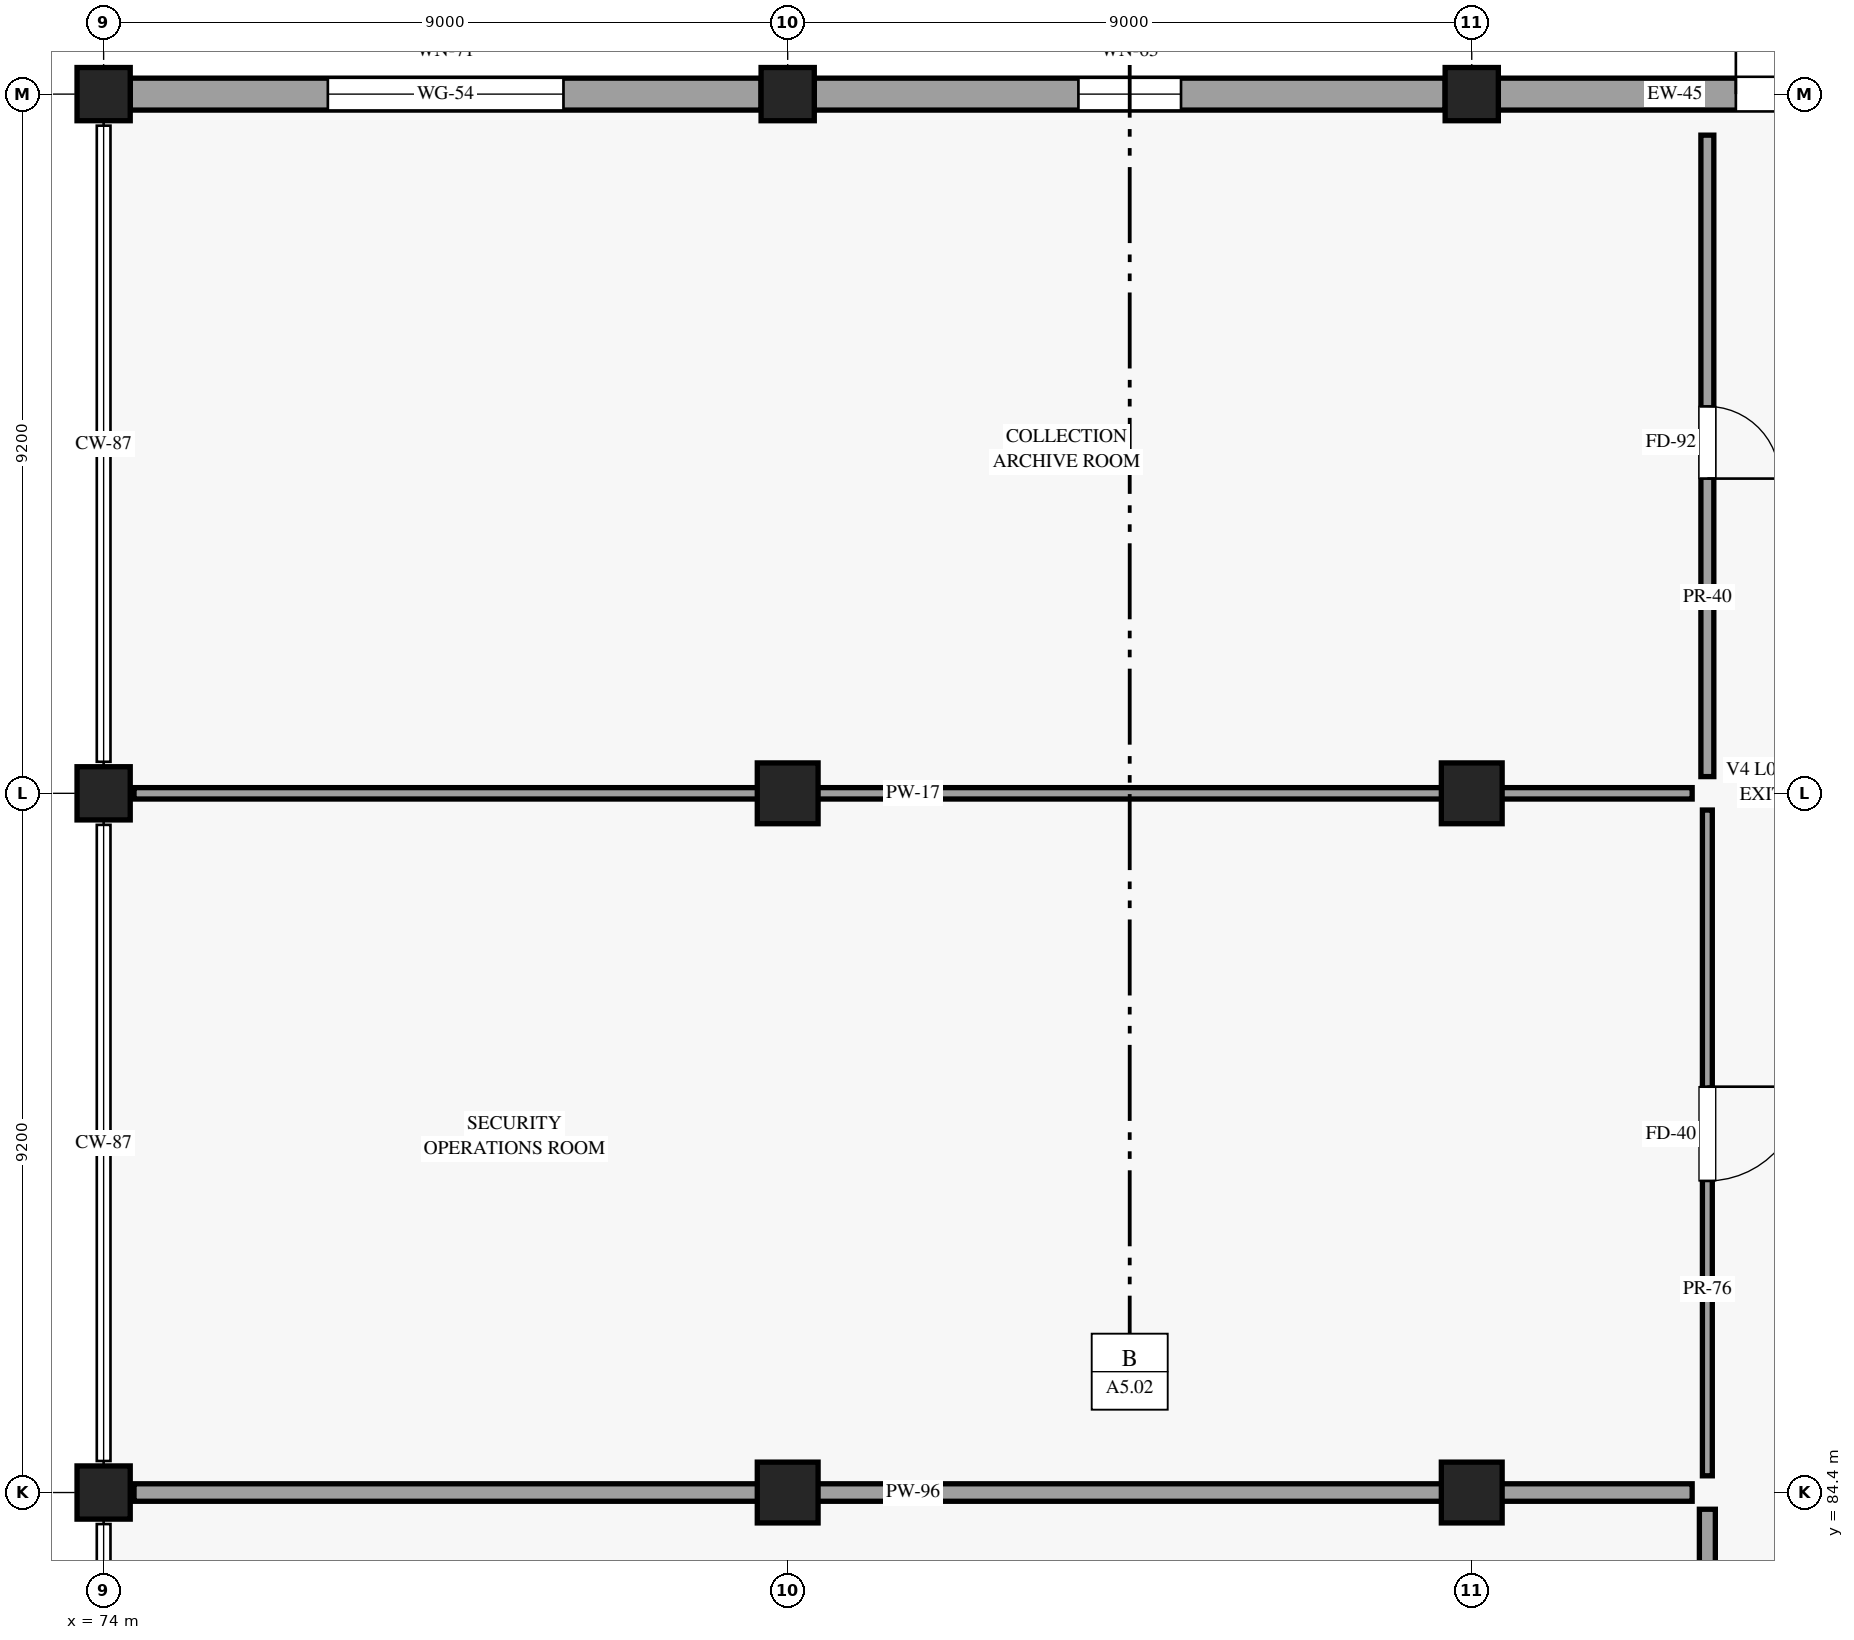
"""IFC4 building model, lengths in metres.
Left out: names, types, materials, properties, quantities, classifications, styles, units other than length and angle.
Written with IfcOpenShell. Run it as: python <this file> out.ifc"""

import sys

from ifc_helpers import new_model, si_unit, direction, frame, frame_2d, origin, origin_2d, place, context, subcontext, project, spatial, rectangle, circle, extrude, element, fill, save


model = new_model("IFC4")
c1 = context("Model", 3, precision=1e-05, world=origin(), true_north=direction((0.0, 1.0)))
c2 = subcontext(c1, "Body", "Model", "MODEL_VIEW")
j1 = project(units=[si_unit("LENGTHUNIT", "METRE"), si_unit("PLANEANGLEUNIT", "RADIAN")], contexts=[c1])
p1 = place(None, origin())
s1 = spatial("IfcSite", under=j1, at=p1, CompositionType="ELEMENT")
p2 = place(p1, origin())
s2 = spatial("IfcBuilding", under=s1, at=p2, CompositionType="ELEMENT")
p3 = place(p2, origin())
s3 = spatial("IfcBuildingStorey", under=s2, at=p3, CompositionType="ELEMENT", Elevation=0.0)
for number, where, z_axis, x_axis in (
    (1, (74.0, 84.4, 0.0), (0.0, 0.0, 1.0), (1.0, 0.0, 0.0)),
    (2, (74.0, 93.6, 0.0), (0.0, 0.0, 1.0), (1.0, 0.0, 0.0)),
    (3, (74.0, 102.8, 0.0), (0.0, 0.0, 1.0), (1.0, 0.0, 0.0)),
):
    element("IfcColumn", number, at=place(p3, frame(where, z_axis=z_axis, x_axis=x_axis)), inside=s3, PredefinedType="COLUMN", context=c2, shape_type="SweptSolid", body=[
        extrude(rectangle(XDim=0.7, YDim=0.7, at=origin_2d()), origin(), (0.0, 0.0, 1.0), 5.4),
    ])
for number, where, z_axis, x_axis in (
    (4, (83.0, 84.4, 0.0), (0.0, 0.0, 1.0), (1.0, 0.0, 0.0)),
    (5, (83.0, 93.6, 0.0), (0.0, 0.0, 1.0), (1.0, 0.0, 0.0)),
):
    element("IfcColumn", number, at=place(p3, frame(where, z_axis=z_axis, x_axis=x_axis)), inside=s3, PredefinedType="COLUMN", context=c2, shape_type="SweptSolid", body=[
        extrude(circle(Radius=0.4, at=origin_2d()), origin(), (0.0, 0.0, 1.0), 5.4),
    ])
p4 = place(p3, frame((83.0, 102.8, 0.0), z_axis=(0.0, 0.0, 1.0), x_axis=(1.0, 0.0, 0.0)))
e6 = element("IfcColumn", 6, at=p4, inside=s3, PredefinedType="COLUMN", context=c2, shape_type="SweptSolid", body=[
    extrude(rectangle(XDim=0.7, YDim=0.7, at=origin_2d()), origin(), (0.0, 0.0, 1.0), 5.4),
])
for number, where, z_axis, x_axis in (
    (7, (92.0, 84.4, 0.0), (0.0, 0.0, 1.0), (1.0, 0.0, 0.0)),
    (8, (92.0, 93.6, 0.0), (0.0, 0.0, 1.0), (1.0, 0.0, 0.0)),
):
    element("IfcColumn", number, at=place(p3, frame(where, z_axis=z_axis, x_axis=x_axis)), inside=s3, PredefinedType="COLUMN", context=c2, shape_type="SweptSolid", body=[
        extrude(circle(Radius=0.4, at=origin_2d()), origin(), (0.0, 0.0, 1.0), 5.4),
    ])
p5 = place(p3, frame((92.0, 102.8, 0.0), z_axis=(0.0, 0.0, 1.0), x_axis=(1.0, 0.0, 0.0)))
e9 = element("IfcColumn", 9, at=p5, inside=s3, PredefinedType="COLUMN", context=c2, shape_type="SweptSolid", body=[
    extrude(rectangle(XDim=0.7, YDim=0.7, at=origin_2d()), origin(), (0.0, 0.0, 1.0), 5.4),
])
p6 = place(p3, frame((74.35, 102.8, 0.0), z_axis=(0.0, 0.0, 1.0), x_axis=(1.0, 0.0, 0.0)))
e10 = element("IfcWall", 10, at=p6, inside=s3, PredefinedType="STANDARD", context=c2, shape_type="SweptSolid", body=[
    extrude(rectangle(XDim=8.3, YDim=0.42, at=frame_2d((4.15, 0.0))), origin(), (0.0, 0.0, 1.0), 4.195),
])
p7 = place(p6, frame((2.6, 0.0, 0.85)))
e11 = element("IfcOpeningElement", 11, at=p7, cuts=e10, PredefinedType="OPENING", context=c2, shape_type="SweptSolid", body=[
    extrude(rectangle(XDim=3.1, YDim=2.3, at=frame_2d((1.55, 1.15))), frame((0.0, 0.22, 0.0), z_axis=(0.0, -1.0, 0.0), x_axis=(1.0, 0.0, 0.0)), (0.0, 0.0, 1.0), 0.44),
])
p8 = place(p3, frame((83.35, 102.8, 0.0), z_axis=(0.0, 0.0, 1.0), x_axis=(1.0, 0.0, 0.0)))
e12 = element("IfcWall", 12, at=p8, inside=s3, PredefinedType="STANDARD", context=c2, shape_type="SweptSolid", body=[
    extrude(rectangle(XDim=8.3, YDim=0.42, at=frame_2d((4.15, 0.0))), origin(), (0.0, 0.0, 1.0), 4.195),
])
p9 = place(p8, frame((3.475, 0.0, 0.85)))
e13 = element("IfcOpeningElement", 13, at=p9, cuts=e12, PredefinedType="OPENING", context=c2, shape_type="SweptSolid", body=[
    extrude(rectangle(XDim=1.35, YDim=1.75, at=frame_2d((0.675, 0.875))), frame((0.0, 0.22, 0.0), z_axis=(0.0, -1.0, 0.0), x_axis=(1.0, 0.0, 0.0)), (0.0, 0.0, 1.0), 0.44),
])
p10 = place(p3, frame((92.35, 102.8, 0.0), z_axis=(0.0, 0.0, 1.0), x_axis=(1.0, 0.0, 0.0)))
e14 = element("IfcWall", 14, at=p10, inside=s3, PredefinedType="STANDARD", context=c2, shape_type="SweptSolid", body=[
    extrude(rectangle(XDim=8.3, YDim=0.42, at=frame_2d((4.15, 0.0))), origin(), (0.0, 0.0, 1.0), 4.195),
])
p11 = place(p10, frame((3.125, 0.0, 0.0)))
e15 = element("IfcOpeningElement", 15, at=p11, cuts=e14, PredefinedType="OPENING", context=c2, shape_type="SweptSolid", body=[
    extrude(rectangle(XDim=2.05, YDim=2.45, at=frame_2d((1.025, 1.225))), frame((0.0, 0.22, 0.0), z_axis=(0.0, -1.0, 0.0), x_axis=(1.0, 0.0, 0.0)), (0.0, 0.0, 1.0), 0.44),
])
p12 = place(p3, frame((95.1, 69.9, 0.0), z_axis=(0.0, 0.0, 1.0), x_axis=(0.0, 1.0, 0.0)))
e16 = element("IfcWall", 16, at=p12, inside=s3, PredefinedType="PARTITIONING", context=c2, shape_type="SweptSolid", body=[
    extrude(rectangle(XDim=14.28, YDim=0.21, at=frame_2d((7.14, 0.0))), origin(), (0.0, 0.0, 1.0), 4.195),
])
p13 = place(p12, frame((10.517, 0.0, 0.0), z_axis=(0.0, 0.0, 1.0), x_axis=(-1.0, 0.0, 0.0)))
e17 = element("IfcOpeningElement", 17, at=p13, cuts=e16, PredefinedType="OPENING", context=c2, shape_type="SweptSolid", body=[
    extrude(rectangle(XDim=1.16, YDim=2.28, at=frame_2d((0.58, 1.14))), frame((0.0, 0.115, 0.0), z_axis=(0.0, -1.0, 0.0), x_axis=(1.0, 0.0, 0.0)), (0.0, 0.0, 1.0), 0.23),
])
p14 = place(p3, frame((74.4, 84.4, 0.0), z_axis=(0.0, 0.0, 1.0), x_axis=(1.0, 0.0, 0.0)))
e18 = element("IfcWall", 18, at=p14, inside=s3, PredefinedType="PARTITIONING", context=c2, shape_type="SweptSolid", body=[
    extrude(rectangle(XDim=20.5, YDim=0.23, at=frame_2d((10.25, 0.0))), origin(), (0.0, 0.0, 1.0), 3.795),
])
p15 = place(p3, frame((95.1, 84.62, 0.0), z_axis=(0.0, 0.0, 1.0), x_axis=(0.0, 1.0, 0.0)))
e19 = element("IfcWall", 19, at=p15, inside=s3, PredefinedType="PARTITIONING", context=c2, shape_type="SweptSolid", body=[
    extrude(rectangle(XDim=8.76, YDim=0.13, at=frame_2d((4.38, 0.0))), origin(), (0.0, 0.0, 1.0), 4.195),
])
p16 = place(p15, frame((5.12, 0.0, 0.0), z_axis=(0.0, 0.0, 1.0), x_axis=(-1.0, 0.0, 0.0)))
e20 = element("IfcOpeningElement", 20, at=p16, cuts=e19, PredefinedType="OPENING", context=c2, shape_type="SweptSolid", body=[
    extrude(rectangle(XDim=1.24, YDim=2.32, at=frame_2d((0.62, 1.16))), frame((0.0, 0.075, 0.0), z_axis=(0.0, -1.0, 0.0), x_axis=(1.0, 0.0, 0.0)), (0.0, 0.0, 1.0), 0.15),
])
p17 = place(p3, frame((74.4, 93.6, 0.0), z_axis=(0.0, 0.0, 1.0), x_axis=(1.0, 0.0, 0.0)))
e21 = element("IfcWall", 21, at=p17, inside=s3, PredefinedType="PARTITIONING", context=c2, shape_type="SweptSolid", body=[
    extrude(rectangle(XDim=20.5, YDim=0.15, at=frame_2d((10.25, 0.0))), origin(), (0.0, 0.0, 1.0), 4.195),
])
p18 = place(p3, frame((95.1, 93.82, 0.0), z_axis=(0.0, 0.0, 1.0), x_axis=(0.0, 1.0, 0.0)))
e22 = element("IfcWall", 22, at=p18, inside=s3, PredefinedType="PARTITIONING", context=c2, shape_type="SweptSolid", body=[
    extrude(rectangle(XDim=8.44, YDim=0.17, at=frame_2d((4.22, 0.0))), origin(), (0.0, 0.0, 1.0), 4.195),
])
p19 = place(p18, frame((4.871, 0.0, 0.0), z_axis=(0.0, 0.0, 1.0), x_axis=(-1.0, 0.0, 0.0)))
e23 = element("IfcOpeningElement", 23, at=p19, cuts=e22, PredefinedType="OPENING", context=c2, shape_type="SweptSolid", body=[
    extrude(rectangle(XDim=0.95, YDim=2.15, at=frame_2d((0.475, 1.075))), frame((0.0, 0.095, 0.0), z_axis=(0.0, -1.0, 0.0), x_axis=(1.0, 0.0, 0.0)), (0.0, 0.0, 1.0), 0.19),
])
p20 = place(p7, origin())
e24 = element("IfcWindow", 24, at=p20, inside=s3, PartitioningType="SINGLE_PANEL", PredefinedType="WINDOW", context=c2, shape_type="SweptSolid", body=[
    extrude(rectangle(XDim=3.1, YDim=2.3, at=frame_2d((1.55, 1.15))), frame((0.0, 0.03, 0.0), z_axis=(0.0, -1.0, 0.0), x_axis=(1.0, 0.0, 0.0)), (0.0, 0.0, 1.0), 0.06),
])
fill(e11, e24)
p21 = place(p9, origin())
e25 = element("IfcWindow", 25, at=p21, inside=s3, PartitioningType="SINGLE_PANEL", PredefinedType="WINDOW", context=c2, shape_type="SweptSolid", body=[
    extrude(rectangle(XDim=1.35, YDim=1.75, at=frame_2d((0.675, 0.875))), frame((0.0, 0.03, 0.0), z_axis=(0.0, -1.0, 0.0), x_axis=(1.0, 0.0, 0.0)), (0.0, 0.0, 1.0), 0.06),
])
fill(e13, e25)
p22 = place(p11, origin())
e26 = element("IfcDoor", 26, at=p22, inside=s3, OperationType="DOUBLE_DOOR_SINGLE_SWING", PredefinedType="DOOR", context=c2, shape_type="SweptSolid", body=[
    extrude(rectangle(XDim=2.05, YDim=2.45, at=frame_2d((1.025, 1.225))), frame((0.0, 0.025, 0.0), z_axis=(0.0, -1.0, 0.0), x_axis=(1.0, 0.0, 0.0)), (0.0, 0.0, 1.0), 0.05),
])
fill(e15, e26)
p23 = place(p16, origin())
e27 = element("IfcDoor", 27, at=p23, inside=s3, OperationType="SINGLE_SWING_LEFT", PredefinedType="DOOR", context=c2, shape_type="SweptSolid", body=[
    extrude(rectangle(XDim=1.24, YDim=2.32, at=frame_2d((0.62, 1.16))), frame((0.0, 0.025, 0.0), z_axis=(0.0, -1.0, 0.0), x_axis=(1.0, 0.0, 0.0)), (0.0, 0.0, 1.0), 0.05),
])
fill(e20, e27)
p24 = place(p19, origin())
e28 = element("IfcDoor", 28, at=p24, inside=s3, OperationType="SINGLE_SWING_RIGHT", PredefinedType="DOOR", context=c2, shape_type="SweptSolid", body=[
    extrude(rectangle(XDim=0.95, YDim=2.15, at=frame_2d((0.475, 1.075))), frame((0.0, 0.025, 0.0), z_axis=(0.0, -1.0, 0.0), x_axis=(1.0, 0.0, 0.0)), (0.0, 0.0, 1.0), 0.05),
])
fill(e23, e28)
save(model, sys.argv[1])
